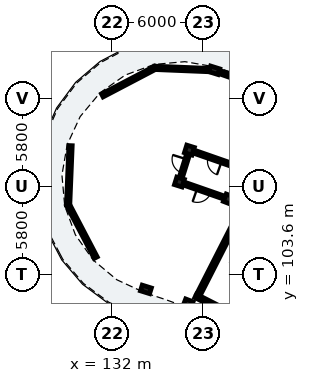
"""IFC4 building model, lengths in metres.
Left out: names, types, materials, properties, quantities, classifications, styles, units other than length and angle.
Written with IfcOpenShell. Run it as: python <this file> out.ifc"""

import sys

from ifc_helpers import new_model, si_unit, direction, frame, frame_2d, origin, origin_2d, place, context, subcontext, project, spatial, rectangle, extrude, element, fill, save


model = new_model("IFC4")
c1 = context("Model", 3, precision=1e-05, world=origin(), true_north=direction((0.0, 1.0)))
c2 = subcontext(c1, "Body", "Model", "MODEL_VIEW")
j1 = project(units=[si_unit("LENGTHUNIT", "METRE"), si_unit("PLANEANGLEUNIT", "RADIAN")], contexts=[c1])
p1 = place(None, origin())
s1 = spatial("IfcSite", under=j1, at=p1, CompositionType="ELEMENT")
p2 = place(p1, origin())
s2 = spatial("IfcBuilding", under=s1, at=p2, CompositionType="ELEMENT")
p3 = place(p2, frame((0.0, 0.0, 42.44)))
s3 = spatial("IfcBuildingStorey", under=s2, at=p3, CompositionType="ELEMENT", Elevation=42.44)
p4 = place(p3, frame((140.684, 108.139, 0.0), z_axis=(0.0, 0.0, 1.0), x_axis=(-0.453992276384, -0.891005618941, 0.0)))
e1 = element("IfcWall", 1, at=p4, inside=s3, PredefinedType="SHEAR", context=c2, shape_type="SweptSolid", body=[
    extrude(rectangle(XDim=6.6, YDim=0.25, at=frame_2d((3.3, 0.0))), origin(), (0.0, 0.0, 1.0), 3.11),
])
p5 = place(p3, frame((137.52, 102.203, 0.0), z_axis=(0.0, 0.0, 1.0), x_axis=(0.891003540237, -0.453996356025, 0.0)))
e2 = element("IfcWall", 2, at=p5, inside=s3, PredefinedType="SHEAR", context=c2, shape_type="SweptSolid", body=[
    extrude(rectangle(XDim=3.42, YDim=0.25, at=frame_2d((1.71, 0.0))), origin(), (0.0, 0.0, 1.0), 3.11),
])
for number, where, z_axis, x_axis in (
    (3, (137.01, 101.667, 0.0), (0.0, 0.0, 1.0), (0.36, 0.933, 0.0)),
    (4, (139.675, 108.57, 0.0), (0.0, 0.0, 1.0), (0.36, 0.933, 0.0)),
):
    element("IfcColumn", number, at=place(p3, frame(where, z_axis=z_axis, x_axis=x_axis)), inside=s3, PredefinedType="COLUMN", context=c2, shape_type="SweptSolid", body=[
        extrude(rectangle(XDim=0.52, YDim=0.52, at=origin_2d()), origin(), (0.0, 0.0, 1.0), 3.1),
    ])
p6 = place(p3, frame((134.243, 102.631, 0.0), z_axis=(0.0, 0.0, 1.0), x_axis=(0.297930225503, 0.954587649581, 0.0)))
e5 = element("IfcColumn", 5, at=p6, inside=s3, PredefinedType="PILASTER", context=c2, shape_type="SweptSolid", body=[
    extrude(rectangle(XDim=0.39, YDim=0.63, at=origin_2d()), origin(), (0.0, 0.0, 1.0), 3.1),
])
for number, where, z_axis, x_axis in (
    (6, (136.448, 109.695, 0.0), (0.0, 0.0, 1.0), (0.298, 0.955, 0.0)),
    (7, (137.103, 111.795, 0.0), (0.0, 0.0, 1.0), (0.298, 0.955, 0.0)),
):
    element("IfcColumn", number, at=place(p3, frame(where, z_axis=z_axis, x_axis=x_axis)), inside=s3, PredefinedType="COLUMN", context=c2, shape_type="SweptSolid", body=[
        extrude(rectangle(XDim=0.52, YDim=0.52, at=origin_2d()), origin(), (0.0, 0.0, 1.0), 3.1),
    ])
p7 = place(p3, frame((138.742, 117.046, 0.0), z_axis=(0.0, 0.0, 1.0), x_axis=(0.297930225503, 0.954587649581, 0.0)))
e8 = element("IfcColumn", 8, at=p7, inside=s3, PredefinedType="PILASTER", context=c2, shape_type="SweptSolid", body=[
    extrude(rectangle(XDim=0.39, YDim=0.63, at=origin_2d()), origin(), (0.0, 0.0, 1.0), 3.1),
])
p8 = place(p3, frame((142.231, 115.829, 0.0), z_axis=(0.0, 0.0, 1.0), x_axis=(-0.944237181458, 0.329266070453, 0.0)))
e9 = element("IfcWall", 9, at=p8, inside=s3, PredefinedType="SOLIDWALL", context=c2, shape_type="SweptSolid", body=[
    extrude(rectangle(XDim=3.531, YDim=0.22, at=frame_2d((1.765, 0.0))), origin(), (0.0, 0.0, 1.0), 2.355),
])
p9 = place(p8, frame((1.125, 0.0, 0.55)))
e10 = element("IfcOpeningElement", 10, at=p9, cuts=e9, PredefinedType="OPENING", context=c2, shape_type="SweptSolid", body=[
    extrude(rectangle(XDim=1.28, YDim=1.56, at=frame_2d((0.64, 0.78))), frame((0.0, 0.12, 0.0), z_axis=(0.0, -1.0, 0.0), x_axis=(1.0, 0.0, 0.0)), (0.0, 0.0, 1.0), 0.24),
])
p10 = place(p3, frame((130.941, 104.722, 0.0), z_axis=(0.0, 0.0, 1.0), x_axis=(-0.464273080326, 0.885692106143, 0.0)))
e11 = element("IfcWall", 11, at=p10, inside=s3, PredefinedType="SOLIDWALL", context=c2, shape_type="SweptSolid", body=[
    extrude(rectangle(XDim=3.908, YDim=0.22, at=frame_2d((1.954, 0.0))), origin(), (0.0, 0.0, 1.0), 2.355),
])
p11 = place(p3, frame((129.126, 108.183, 0.0), z_axis=(0.0, 0.0, 1.0), x_axis=(0.040669088934, 0.999172670365, 0.0)))
e12 = element("IfcWall", 12, at=p11, inside=s3, PredefinedType="SOLIDWALL", context=c2, shape_type="SweptSolid", body=[
    extrude(rectangle(XDim=3.908, YDim=0.22, at=frame_2d((1.954, 0.0))), origin(), (0.0, 0.0, 1.0), 2.355),
])
p12 = place(p11, frame((1.029, 0.0, 0.4)))
e13 = element("IfcOpeningElement", 13, at=p12, cuts=e12, PredefinedType="OPENING", context=c2, shape_type="SweptSolid", body=[
    extrude(rectangle(XDim=1.85, YDim=1.72, at=frame_2d((0.925, 0.86))), frame((0.0, 0.12, 0.0), z_axis=(0.0, -1.0, 0.0), x_axis=(1.0, 0.0, 0.0)), (0.0, 0.0, 1.0), 0.24),
])
p13 = place(p3, frame((131.375, 115.39, 0.0), z_axis=(0.0, 0.0, 1.0), x_axis=(0.8856664179, 0.464322082399, 0.0)))
e14 = element("IfcWall", 14, at=p13, inside=s3, PredefinedType="SOLIDWALL", context=c2, shape_type="SweptSolid", body=[
    extrude(rectangle(XDim=3.908, YDim=0.22, at=frame_2d((1.954, 0.0))), origin(), (0.0, 0.0, 1.0), 2.355),
])
p14 = place(p3, frame((134.837, 117.205, 0.0), z_axis=(0.0, 0.0, 1.0), x_axis=(0.99917012986, -0.040731457088, 0.0)))
e15 = element("IfcWall", 15, at=p14, inside=s3, PredefinedType="SOLIDWALL", context=c2, shape_type="SweptSolid", body=[
    extrude(rectangle(XDim=3.908, YDim=0.22, at=frame_2d((1.954, 0.0))), origin(), (0.0, 0.0, 1.0), 2.355),
])
p15 = place(p14, frame((1.029, 0.0, 0.4)))
e16 = element("IfcOpeningElement", 16, at=p15, cuts=e15, PredefinedType="OPENING", context=c2, shape_type="SweptSolid", body=[
    extrude(rectangle(XDim=1.85, YDim=1.72, at=frame_2d((0.925, 0.86))), frame((0.0, 0.12, 0.0), z_axis=(0.0, -1.0, 0.0), x_axis=(1.0, 0.0, 0.0)), (0.0, 0.0, 1.0), 0.24),
])
p16 = place(p3, frame((140.137, 110.738, 0.0), z_axis=(0.0, 0.0, 1.0), x_axis=(-0.944253820929, 0.329218349522, 0.0)))
e17 = element("IfcWall", 17, at=p16, inside=s3, PredefinedType="PARTITIONING", context=c2, shape_type="SweptSolid", body=[
    extrude(rectangle(XDim=2.863, YDim=0.205, at=frame_2d((1.432, 0.0))), origin(), (0.0, 0.0, 1.0), 2.37),
])
p17 = place(p16, frame((0.967, 0.0, 0.0)))
e18 = element("IfcOpeningElement", 18, at=p17, cuts=e17, PredefinedType="OPENING", context=c2, shape_type="SweptSolid", body=[
    extrude(rectangle(XDim=0.93, YDim=2.12, at=frame_2d((0.465, 1.06))), frame((0.0, 0.113, 0.0), z_axis=(0.0, -1.0, 0.0), x_axis=(1.0, 0.0, 0.0)), (0.0, 0.0, 1.0), 0.225),
])
p18 = place(p3, frame((139.345, 108.685, 0.0), z_axis=(0.0, 0.0, 1.0), x_axis=(-0.944265123647, 0.329185929627, 0.0)))
e19 = element("IfcWall", 19, at=p18, inside=s3, PredefinedType="PARTITIONING", context=c2, shape_type="SweptSolid", body=[
    extrude(rectangle(XDim=2.718, YDim=0.205, at=frame_2d((1.359, 0.0))), origin(), (0.0, 0.0, 1.0), 2.37),
])
p19 = place(p18, frame((0.894, 0.0, 0.0)))
e20 = element("IfcOpeningElement", 20, at=p19, cuts=e19, PredefinedType="OPENING", context=c2, shape_type="SweptSolid", body=[
    extrude(rectangle(XDim=0.93, YDim=2.12, at=frame_2d((0.465, 1.06))), frame((0.0, 0.113, 0.0), z_axis=(0.0, -1.0, 0.0), x_axis=(1.0, 0.0, 0.0)), (0.0, 0.0, 1.0), 0.225),
])
p20 = place(p3, frame((136.463, 109.743, 0.0), z_axis=(0.0, 0.0, 1.0), x_axis=(0.297857918398, 0.954610213882, 0.0)))
e21 = element("IfcWall", 21, at=p20, inside=s3, PredefinedType="PARTITIONING", context=c2, shape_type="SweptSolid", body=[
    extrude(rectangle(XDim=2.1, YDim=0.205, at=frame_2d((1.05, 0.0))), origin(), (0.0, 0.0, 1.0), 2.37),
])
p21 = place(p20, frame((0.57, 0.0, 0.0)))
e22 = element("IfcOpeningElement", 22, at=p21, cuts=e21, PredefinedType="OPENING", context=c2, shape_type="SweptSolid", body=[
    extrude(rectangle(XDim=0.95, YDim=2.13, at=frame_2d((0.475, 1.065))), frame((0.0, 0.113, 0.0), z_axis=(0.0, -1.0, 0.0), x_axis=(1.0, 0.0, 0.0)), (0.0, 0.0, 1.0), 0.225),
])
p22 = place(p12, origin())
e23 = element("IfcWindow", 23, at=p22, inside=s3, PartitioningType="SINGLE_PANEL", PredefinedType="WINDOW", context=c2, shape_type="SweptSolid", body=[
    extrude(rectangle(XDim=1.85, YDim=1.72, at=frame_2d((0.925, 0.86))), frame((0.0, 0.03, 0.0), z_axis=(0.0, -1.0, 0.0), x_axis=(1.0, 0.0, 0.0)), (0.0, 0.0, 1.0), 0.06),
])
fill(e13, e23)
p23 = place(p15, origin())
e24 = element("IfcWindow", 24, at=p23, inside=s3, PartitioningType="SINGLE_PANEL", PredefinedType="WINDOW", context=c2, shape_type="SweptSolid", body=[
    extrude(rectangle(XDim=1.85, YDim=1.72, at=frame_2d((0.925, 0.86))), frame((0.0, 0.03, 0.0), z_axis=(0.0, -1.0, 0.0), x_axis=(1.0, 0.0, 0.0)), (0.0, 0.0, 1.0), 0.06),
])
fill(e16, e24)
p24 = place(p17, origin())
e25 = element("IfcDoor", 25, at=p24, inside=s3, OperationType="SINGLE_SWING_LEFT", PredefinedType="DOOR", context=c2, shape_type="SweptSolid", body=[
    extrude(rectangle(XDim=0.93, YDim=2.12, at=frame_2d((0.465, 1.06))), frame((0.0, 0.025, 0.0), z_axis=(0.0, -1.0, 0.0), x_axis=(1.0, 0.0, 0.0)), (0.0, 0.0, 1.0), 0.05),
])
fill(e18, e25)
p25 = place(p19, origin())
e26 = element("IfcDoor", 26, at=p25, inside=s3, OperationType="SINGLE_SWING_RIGHT", PredefinedType="DOOR", context=c2, shape_type="SweptSolid", body=[
    extrude(rectangle(XDim=0.93, YDim=2.12, at=frame_2d((0.465, 1.06))), frame((0.0, 0.025, 0.0), z_axis=(0.0, -1.0, 0.0), x_axis=(1.0, 0.0, 0.0)), (0.0, 0.0, 1.0), 0.05),
])
fill(e20, e26)
p26 = place(p21, origin())
e27 = element("IfcDoor", 27, at=p26, inside=s3, OperationType="SINGLE_SWING_RIGHT", PredefinedType="DOOR", context=c2, shape_type="SweptSolid", body=[
    extrude(rectangle(XDim=0.95, YDim=2.13, at=frame_2d((0.475, 1.065))), frame((0.0, 0.025, 0.0), z_axis=(0.0, -1.0, 0.0), x_axis=(1.0, 0.0, 0.0)), (0.0, 0.0, 1.0), 0.05),
])
fill(e22, e27)
save(model, sys.argv[1])
